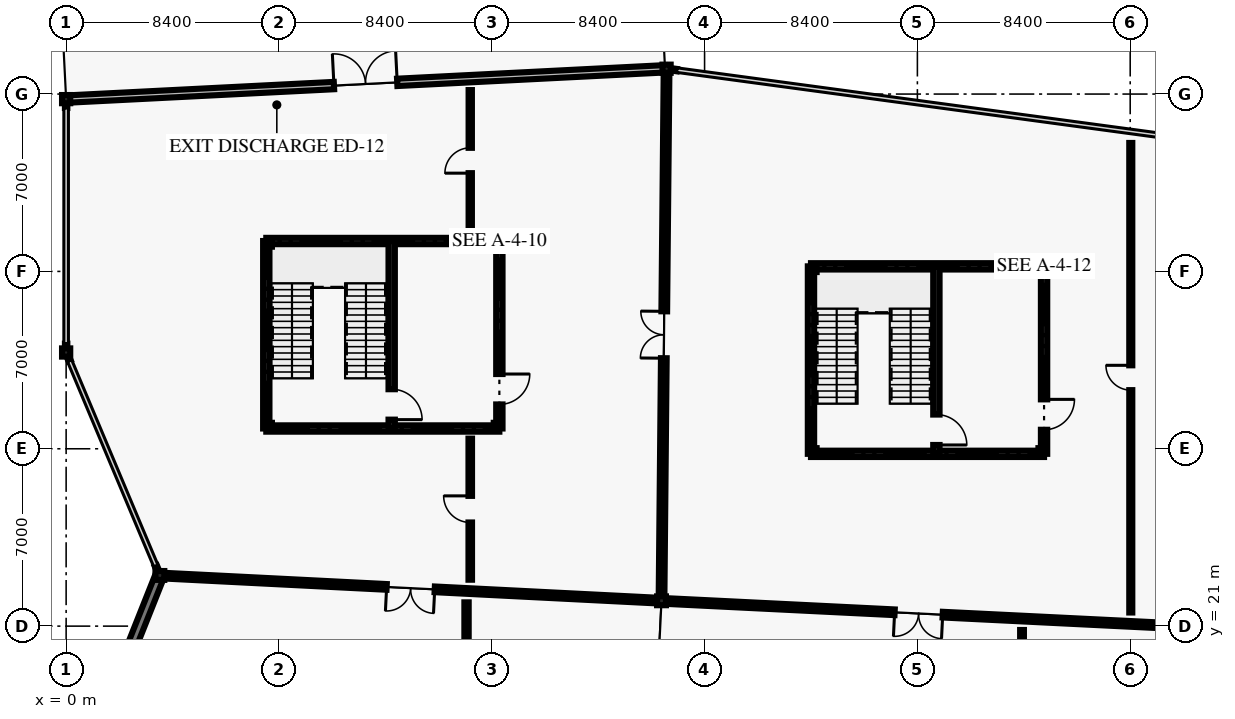
"""IFC4 building model, lengths in metres.
Left out: names, types, materials, properties, quantities, classifications, styles, units other than length and angle.
Written with IfcOpenShell. Run it as: python <this file> out.ifc"""

import sys

from ifc_helpers import new_model, si_unit, direction, frame, frame_2d, origin, origin_2d, place, context, subcontext, project, spatial, rectangle, hollow_circle, i_section, extrude, element, fill, save


model = new_model("IFC4")
c1 = context("Model", 3, precision=1e-05, world=origin(), true_north=direction((0.0, 1.0)))
c2 = subcontext(c1, "Body", "Model", "MODEL_VIEW")
j1 = project(units=[si_unit("LENGTHUNIT", "METRE"), si_unit("PLANEANGLEUNIT", "RADIAN")], contexts=[c1])
p1 = place(None, origin())
s1 = spatial("IfcSite", under=j1, at=p1, CompositionType="ELEMENT")
p2 = place(p1, origin())
s2 = spatial("IfcBuilding", under=s1, at=p2, CompositionType="ELEMENT")
p3 = place(p2, origin())
s3 = spatial("IfcBuildingStorey", under=s2, at=p3, CompositionType="ELEMENT", Elevation=0.0)
for number, where, z_axis, x_axis in (
    (1, (0.0, 31.8, 0.0), (0.0, 0.0, 1.0), (1.0, 0.0, 0.0)),
    (2, (0.0, 41.8, 0.0), (0.0, 0.0, 1.0), (1.0, 0.0, 0.0)),
):
    element("IfcColumn", number, at=place(p3, frame(where, z_axis=z_axis, x_axis=x_axis)), inside=s3, PredefinedType="COLUMN", context=c2, shape_type="SweptSolid", body=[
        extrude(hollow_circle(Radius=0.162, WallThickness=0.01, at=origin_2d()), origin(), (0.0, 0.0, 1.0), 5.4),
    ])
for number, where, z_axis, x_axis in (
    (3, (3.7, 23.0, 0.0), (0.0, 0.0, 1.0), (1.0, 0.0, 0.0)),
    (4, (23.5, 22.0, 0.0), (0.0, 0.0, 1.0), (1.0, 0.0, 0.0)),
):
    element("IfcColumn", number, at=place(p3, frame(where, z_axis=z_axis, x_axis=x_axis)), inside=s3, PredefinedType="COLUMN", context=c2, shape_type="SweptSolid", body=[
        extrude(i_section(OverallWidth=0.35, OverallDepth=0.35, WebThickness=0.02, FlangeThickness=0.028, at=origin_2d()), origin(), (0.0, 0.0, 1.0), 5.4),
    ])
p4 = place(p3, frame((23.7, 43.0, 0.0), z_axis=(0.0, 0.0, 1.0), x_axis=(1.0, 0.0, 0.0)))
e5 = element("IfcColumn", 5, at=p4, inside=s3, PredefinedType="COLUMN", context=c2, shape_type="SweptSolid", body=[
    extrude(hollow_circle(Radius=0.162, WallThickness=0.01, at=origin_2d()), origin(), (0.0, 0.0, 1.0), 5.4),
])
for number, where, z_axis, x_axis in (
    (6, (8.02, 28.92, 0.0), (0.0, 0.0, 1.0), (1.0, 0.0, 0.0)),
    (7, (16.98, 28.92, 0.0), (0.0, 0.0, 1.0), (1.0, 0.0, 0.0)),
    (8, (16.98, 36.08, 0.0), (0.0, 0.0, 1.0), (1.0, 0.0, 0.0)),
    (9, (8.02, 36.08, 0.0), (0.0, 0.0, 1.0), (1.0, 0.0, 0.0)),
    (10, (29.52, 27.92, 0.0), (0.0, 0.0, 1.0), (1.0, 0.0, 0.0)),
    (11, (38.48, 27.92, 0.0), (0.0, 0.0, 1.0), (1.0, 0.0, 0.0)),
    (12, (38.48, 35.08, 0.0), (0.0, 0.0, 1.0), (1.0, 0.0, 0.0)),
    (13, (29.52, 35.08, 0.0), (0.0, 0.0, 1.0), (1.0, 0.0, 0.0)),
):
    element("IfcColumn", number, at=place(p3, frame(where, z_axis=z_axis, x_axis=x_axis)), inside=s3, PredefinedType="COLUMN", context=c2, shape_type="SweptSolid", body=[
        extrude(i_section(OverallWidth=0.205, OverallDepth=0.21, WebThickness=0.009, FlangeThickness=0.014, FilletRadius=0.01, at=origin_2d()), origin(), (0.0, 0.0, 1.0), 5.4),
    ])
p5 = place(p3, frame((0.0, 13.7, 0.0), z_axis=(0.0, 0.0, 1.0), x_axis=(0.36968498985, 0.929157149399, 0.0)))
e14 = element("IfcWall", 14, at=p5, inside=s3, PredefinedType="SOLIDWALL", context=c2, shape_type="SweptSolid", body=[
    extrude(rectangle(XDim=9.949, YDim=0.36, at=frame_2d((4.975, 0.0))), origin(), (0.0, 0.0, 1.0), 4.22),
])
p6 = place(p3, frame((0.0, 41.8, 0.0), z_axis=(0.0, 0.0, 1.0), x_axis=(0.998720475109, 0.05057086709, 0.0)))
e15 = element("IfcWall", 15, at=p6, inside=s3, PredefinedType="SOLIDWALL", context=c2, shape_type="SweptSolid", body=[
    extrude(rectangle(XDim=23.67, YDim=0.29, at=frame_2d((11.835, 0.0))), origin(), (0.0, 0.0, 1.0), 4.22),
])
p7 = place(p6, frame((10.585, 0.0, 0.0)))
e16 = element("IfcOpeningElement", 16, at=p7, cuts=e15, PredefinedType="OPENING", context=c2, shape_type="SweptSolid", body=[
    extrude(rectangle(XDim=2.5, YDim=2.45, at=frame_2d((1.25, 1.225))), frame((0.0, 0.155, 0.0), z_axis=(0.0, -1.0, 0.0), x_axis=(1.0, 0.0, 0.0)), (0.0, 0.0, 1.0), 0.31),
])
p8 = place(p3, frame((0.0, 31.842, 0.0), z_axis=(0.0, 0.0, 1.0), x_axis=(0.0, 1.0, 0.0)))
e17 = element("IfcWall", 17, at=p8, inside=s3, PredefinedType="SOLIDWALL", context=c2, shape_type="SweptSolid", body=[
    extrude(rectangle(XDim=0.308, YDim=0.095, at=frame_2d((0.154, 0.0))), origin(), (0.0, 0.0, 1.0), 4.22),
])
for number, where, z_axis, x_axis in (
    (18, (0.0, 41.45, 0.0), (0.0, 0.0, 1.0), (0.0, 1.0, 0.0)),
    (19, (3.661, 23.094, 0.0), (0.0, 0.0, 1.0), (-0.389, 0.921, 0.0)),
    (20, (0.136, 31.477, 0.0), (0.0, 0.0, 1.0), (-0.389, 0.921, 0.0)),
):
    element("IfcWall", number, at=place(p3, frame(where, z_axis=z_axis, x_axis=x_axis)), inside=s3, PredefinedType="SOLIDWALL", context=c2, shape_type="SweptSolid", body=[
        extrude(rectangle(XDim=0.308, YDim=0.095, at=frame_2d((0.154, 0.0))), origin(), (0.0, 0.0, 1.0), 4.22),
    ])
p9 = place(p3, frame((23.802, 42.986, 0.0), z_axis=(0.0, 0.0, 1.0), x_axis=(0.991074779294, -0.133307096014, 0.0)))
e21 = element("IfcWall", 21, at=p9, inside=s3, PredefinedType="SOLIDWALL", context=c2, shape_type="SweptSolid", body=[
    extrude(rectangle(XDim=0.308, YDim=0.095, at=frame_2d((0.154, 0.0))), origin(), (0.0, 0.0, 1.0), 4.22),
])
p10 = place(p3, frame((23.5, 22.0, 0.0), z_axis=(0.0, 0.0, 1.0), x_axis=(-0.99872706092, 0.050440636263, 0.0)))
e22 = element("IfcWall", 22, at=p10, inside=s3, PredefinedType="SOLIDWALL", context=c2, shape_type="SweptSolid", body=[
    extrude(rectangle(XDim=19.825, YDim=0.225, at=frame_2d((9.913, 0.0))), origin(), (0.0, 0.0, 1.0), 4.62),
])
p11 = place(p10, frame((8.963, 0.0, 0.0)))
e23 = element("IfcOpeningElement", 23, at=p11, cuts=e22, PredefinedType="OPENING", context=c2, shape_type="SweptSolid", body=[
    extrude(rectangle(XDim=1.9, YDim=2.35, at=frame_2d((0.95, 1.175))), frame((0.0, 0.123, 0.0), z_axis=(0.0, -1.0, 0.0), x_axis=(1.0, 0.0, 0.0)), (0.0, 0.0, 1.0), 0.245),
])
p12 = place(p3, frame((43.8, 21.0, 0.0), z_axis=(0.0, 0.0, 1.0), x_axis=(-0.998788882418, 0.049201304434, 0.0)))
e24 = element("IfcWall", 24, at=p12, inside=s3, PredefinedType="SOLIDWALL", context=c2, shape_type="SweptSolid", body=[
    extrude(rectangle(XDim=20.325, YDim=0.225, at=frame_2d((10.162, 0.0))), origin(), (0.0, 0.0, 1.0), 4.62),
])
p13 = place(p12, frame((9.212, 0.0, 0.0)))
e25 = element("IfcOpeningElement", 25, at=p13, cuts=e24, PredefinedType="OPENING", context=c2, shape_type="SweptSolid", body=[
    extrude(rectangle(XDim=1.9, YDim=2.35, at=frame_2d((0.95, 1.175))), frame((0.0, 0.123, 0.0), z_axis=(0.0, -1.0, 0.0), x_axis=(1.0, 0.0, 0.0)), (0.0, 0.0, 1.0), 0.245),
])
p14 = place(p3, frame((23.5, 22.0, 0.0), z_axis=(0.0, 0.0, 1.0), x_axis=(0.009521052802, 0.99995467375, 0.0)))
e26 = element("IfcWall", 26, at=p14, inside=s3, PredefinedType="SOLIDWALL", context=c2, shape_type="SweptSolid", body=[
    extrude(rectangle(XDim=21.001, YDim=0.225, at=frame_2d((10.5, 0.0))), origin(), (0.0, 0.0, 1.0), 4.62),
])
p15 = place(p14, frame((9.575, 0.0, 0.0)))
e27 = element("IfcOpeningElement", 27, at=p15, cuts=e26, PredefinedType="OPENING", context=c2, shape_type="SweptSolid", body=[
    extrude(rectangle(XDim=1.85, YDim=2.4, at=frame_2d((0.925, 1.2))), frame((0.0, 0.123, 0.0), z_axis=(0.0, -1.0, 0.0), x_axis=(1.0, 0.0, 0.0)), (0.0, 0.0, 1.0), 0.245),
])
p16 = place(p3, frame((15.804, 1.018, 0.0), z_axis=(0.0, 0.0, 1.0), x_axis=(0.0, 1.0, 0.0)))
e28 = element("IfcWall", 28, at=p16, inside=s3, PredefinedType="PARTITIONING", context=c2, shape_type="SweptSolid", body=[
    extrude(rectangle(XDim=20.92, YDim=0.17, at=frame_2d((10.46, 0.0))), origin(), (0.0, 0.0, 1.0), 3.92),
])
p17 = place(p16, frame((9.985, 0.0, 0.0)))
e29 = element("IfcOpeningElement", 29, at=p17, cuts=e28, PredefinedType="OPENING", context=c2, shape_type="SweptSolid", body=[
    extrude(rectangle(XDim=0.95, YDim=2.15, at=frame_2d((0.475, 1.075))), frame((0.0, 0.095, 0.0), z_axis=(0.0, -1.0, 0.0), x_axis=(1.0, 0.0, 0.0)), (0.0, 0.0, 1.0), 0.19),
])
p18 = place(p3, frame((37.73, 16.1, 0.0), z_axis=(0.0, 0.0, 1.0), x_axis=(0.0, 1.0, 0.0)))
e30 = element("IfcWall", 30, at=p18, inside=s3, PredefinedType="PARTITIONING", context=c2, shape_type="SweptSolid", body=[
    extrude(rectangle(XDim=4.748, YDim=0.15, at=frame_2d((2.374, 0.0))), origin(), (0.0, 0.0, 1.0), 3.92),
])
p19 = place(p18, frame((1.884, 0.0, 0.0)))
e31 = element("IfcOpeningElement", 31, at=p19, cuts=e30, PredefinedType="OPENING", context=c2, shape_type="SweptSolid", body=[
    extrude(rectangle(XDim=0.98, YDim=2.15, at=frame_2d((0.49, 1.075))), frame((0.0, 0.085, 0.0), z_axis=(0.0, -1.0, 0.0), x_axis=(1.0, 0.0, 0.0)), (0.0, 0.0, 1.0), 0.17),
])
p20 = place(p3, frame((15.951, 22.832, 0.0), z_axis=(0.0, 0.0, 1.0), x_axis=(0.0, 1.0, 0.0)))
e32 = element("IfcWall", 32, at=p20, inside=s3, PredefinedType="PARTITIONING", context=c2, shape_type="SweptSolid", body=[
    extrude(rectangle(XDim=5.568, YDim=0.14, at=frame_2d((2.784, 0.0))), origin(), (0.0, 0.0, 1.0), 3.92),
])
p21 = place(p20, frame((2.259, 0.0, 0.0)))
e33 = element("IfcOpeningElement", 33, at=p21, cuts=e32, PredefinedType="OPENING", context=c2, shape_type="SweptSolid", body=[
    extrude(rectangle(XDim=1.05, YDim=2.2, at=frame_2d((0.525, 1.1))), frame((0.0, 0.08, 0.0), z_axis=(0.0, -1.0, 0.0), x_axis=(1.0, 0.0, 0.0)), (0.0, 0.0, 1.0), 0.16),
])
p22 = place(p3, frame((15.951, 36.6, 0.0), z_axis=(0.0, 0.0, 1.0), x_axis=(0.0, 1.0, 0.0)))
e34 = element("IfcWall", 34, at=p22, inside=s3, PredefinedType="PARTITIONING", context=c2, shape_type="SweptSolid", body=[
    extrude(rectangle(XDim=5.557, YDim=0.13, at=frame_2d((2.778, 0.0))), origin(), (0.0, 0.0, 1.0), 3.92),
])
p23 = place(p22, frame((2.278, 0.0, 0.0)))
e35 = element("IfcOpeningElement", 35, at=p23, cuts=e34, PredefinedType="OPENING", context=c2, shape_type="SweptSolid", body=[
    extrude(rectangle(XDim=1.0, YDim=2.15, at=frame_2d((0.5, 1.075))), frame((0.0, 0.075, 0.0), z_axis=(0.0, -1.0, 0.0), x_axis=(1.0, 0.0, 0.0)), (0.0, 0.0, 1.0), 0.15),
])
p24 = place(p3, frame((42.023, 21.538, 0.0), z_axis=(0.0, 0.0, 1.0), x_axis=(0.0, 1.0, 0.0)))
e36 = element("IfcWall", 36, at=p24, inside=s3, PredefinedType="PARTITIONING", context=c2, shape_type="SweptSolid", body=[
    extrude(rectangle(XDim=18.532, YDim=0.12, at=frame_2d((9.266, 0.0))), origin(), (0.0, 0.0, 1.0), 3.92),
])
p25 = place(p24, frame((8.776, 0.0, 0.0)))
e37 = element("IfcOpeningElement", 37, at=p25, cuts=e36, PredefinedType="OPENING", context=c2, shape_type="SweptSolid", body=[
    extrude(rectangle(XDim=0.98, YDim=2.15, at=frame_2d((0.49, 1.075))), frame((0.0, 0.07, 0.0), z_axis=(0.0, -1.0, 0.0), x_axis=(1.0, 0.0, 0.0)), (0.0, 0.0, 1.0), 0.14),
])
p26 = place(p3, frame((7.9, 28.8, 0.0), z_axis=(0.0, 0.0, 1.0), x_axis=(0.0, 1.0, 0.0)))
e38 = element("IfcWall", 38, at=p26, inside=s3, PredefinedType="SHEAR", context=c2, shape_type="SweptSolid", body=[
    extrude(rectangle(XDim=7.4, YDim=0.25, at=frame_2d((3.7, 0.0))), origin(), (0.0, 0.0, 1.0), 5.16),
])
for number, where, z_axis, x_axis in (
    (39, (7.9, 36.2, 0.0), (0.0, 0.0, 1.0), (1.0, 0.0, 0.0)),
    (40, (17.1, 28.8, 0.0), (0.0, 0.0, 1.0), (-1.0, 0.0, 0.0)),
):
    element("IfcWall", number, at=place(p3, frame(where, z_axis=z_axis, x_axis=x_axis)), inside=s3, PredefinedType="SHEAR", context=c2, shape_type="SweptSolid", body=[
        extrude(rectangle(XDim=9.2, YDim=0.25, at=frame_2d((4.6, 0.0))), origin(), (0.0, 0.0, 1.0), 5.16),
    ])
p27 = place(p3, frame((17.1, 36.2, 0.0), z_axis=(0.0, 0.0, 1.0), x_axis=(0.0, -1.0, 0.0)))
e41 = element("IfcWall", 41, at=p27, inside=s3, PredefinedType="SHEAR", context=c2, shape_type="SweptSolid", body=[
    extrude(rectangle(XDim=7.4, YDim=0.25, at=frame_2d((3.7, 0.0))), origin(), (0.0, 0.0, 1.0), 5.16),
])
p28 = place(p27, frame((5.25, 0.0, 0.0)))
e42 = element("IfcOpeningElement", 42, at=p28, cuts=e41, PredefinedType="OPENING", context=c2, shape_type="SweptSolid", body=[
    extrude(rectangle(XDim=1.2, YDim=2.2, at=frame_2d((0.6, 1.1))), frame((0.0, 0.135, 0.0), z_axis=(0.0, -1.0, 0.0), x_axis=(1.0, 0.0, 0.0)), (0.0, 0.0, 1.0), 0.27),
])
p29 = place(p3, frame((12.85, 36.2, 0.0), z_axis=(0.0, 0.0, 1.0), x_axis=(0.0, -1.0, 0.0)))
e43 = element("IfcWall", 43, at=p29, inside=s3, PredefinedType="SHEAR", context=c2, shape_type="SweptSolid", body=[
    extrude(rectangle(XDim=7.4, YDim=0.25, at=frame_2d((3.7, 0.0))), origin(), (0.0, 0.0, 1.0), 5.16),
])
p30 = place(p29, frame((5.85, 0.0, 0.0)))
e44 = element("IfcOpeningElement", 44, at=p30, cuts=e43, PredefinedType="OPENING", context=c2, shape_type="SweptSolid", body=[
    extrude(rectangle(XDim=1.2, YDim=2.2, at=frame_2d((0.6, 1.1))), frame((0.0, 0.135, 0.0), z_axis=(0.0, -1.0, 0.0), x_axis=(1.0, 0.0, 0.0)), (0.0, 0.0, 1.0), 0.27),
])
p31 = place(p3, frame((29.4, 27.8, 0.0), z_axis=(0.0, 0.0, 1.0), x_axis=(0.0, 1.0, 0.0)))
e45 = element("IfcWall", 45, at=p31, inside=s3, PredefinedType="SHEAR", context=c2, shape_type="SweptSolid", body=[
    extrude(rectangle(XDim=7.4, YDim=0.25, at=frame_2d((3.7, 0.0))), origin(), (0.0, 0.0, 1.0), 5.16),
])
for number, where, z_axis, x_axis in (
    (46, (29.4, 35.2, 0.0), (0.0, 0.0, 1.0), (1.0, 0.0, 0.0)),
    (47, (38.6, 27.8, 0.0), (0.0, 0.0, 1.0), (-1.0, 0.0, 0.0)),
):
    element("IfcWall", number, at=place(p3, frame(where, z_axis=z_axis, x_axis=x_axis)), inside=s3, PredefinedType="SHEAR", context=c2, shape_type="SweptSolid", body=[
        extrude(rectangle(XDim=9.2, YDim=0.25, at=frame_2d((4.6, 0.0))), origin(), (0.0, 0.0, 1.0), 5.16),
    ])
p32 = place(p3, frame((38.6, 35.2, 0.0), z_axis=(0.0, 0.0, 1.0), x_axis=(0.0, -1.0, 0.0)))
e48 = element("IfcWall", 48, at=p32, inside=s3, PredefinedType="SHEAR", context=c2, shape_type="SweptSolid", body=[
    extrude(rectangle(XDim=7.4, YDim=0.25, at=frame_2d((3.7, 0.0))), origin(), (0.0, 0.0, 1.0), 5.16),
])
p33 = place(p32, frame((5.25, 0.0, 0.0)))
e49 = element("IfcOpeningElement", 49, at=p33, cuts=e48, PredefinedType="OPENING", context=c2, shape_type="SweptSolid", body=[
    extrude(rectangle(XDim=1.2, YDim=2.2, at=frame_2d((0.6, 1.1))), frame((0.0, 0.135, 0.0), z_axis=(0.0, -1.0, 0.0), x_axis=(1.0, 0.0, 0.0)), (0.0, 0.0, 1.0), 0.27),
])
p34 = place(p3, frame((34.35, 35.2, 0.0), z_axis=(0.0, 0.0, 1.0), x_axis=(0.0, -1.0, 0.0)))
e50 = element("IfcWall", 50, at=p34, inside=s3, PredefinedType="SHEAR", context=c2, shape_type="SweptSolid", body=[
    extrude(rectangle(XDim=7.4, YDim=0.25, at=frame_2d((3.7, 0.0))), origin(), (0.0, 0.0, 1.0), 5.16),
])
p35 = place(p34, frame((5.85, 0.0, 0.0)))
e51 = element("IfcOpeningElement", 51, at=p35, cuts=e50, PredefinedType="OPENING", context=c2, shape_type="SweptSolid", body=[
    extrude(rectangle(XDim=1.2, YDim=2.2, at=frame_2d((0.6, 1.1))), frame((0.0, 0.135, 0.0), z_axis=(0.0, -1.0, 0.0), x_axis=(1.0, 0.0, 0.0)), (0.0, 0.0, 1.0), 0.27),
])
p36 = place(p7, origin())
e52 = element("IfcDoor", 52, at=p36, inside=s3, OperationType="DOUBLE_DOOR_SINGLE_SWING", PredefinedType="DOOR", context=c2, shape_type="SweptSolid", body=[
    extrude(rectangle(XDim=2.5, YDim=2.45, at=frame_2d((1.25, 1.225))), frame((0.0, 0.025, 0.0), z_axis=(0.0, -1.0, 0.0), x_axis=(1.0, 0.0, 0.0)), (0.0, 0.0, 1.0), 0.05),
])
fill(e16, e52)
p37 = place(p11, origin())
e53 = element("IfcDoor", 53, at=p37, inside=s3, OperationType="DOUBLE_DOOR_SINGLE_SWING", PredefinedType="DOOR", context=c2, shape_type="SweptSolid", body=[
    extrude(rectangle(XDim=1.9, YDim=2.35, at=frame_2d((0.95, 1.175))), frame((0.0, 0.025, 0.0), z_axis=(0.0, -1.0, 0.0), x_axis=(1.0, 0.0, 0.0)), (0.0, 0.0, 1.0), 0.05),
])
fill(e23, e53)
p38 = place(p13, origin())
e54 = element("IfcDoor", 54, at=p38, inside=s3, OperationType="DOUBLE_DOOR_SINGLE_SWING", PredefinedType="DOOR", context=c2, shape_type="SweptSolid", body=[
    extrude(rectangle(XDim=1.9, YDim=2.35, at=frame_2d((0.95, 1.175))), frame((0.0, 0.025, 0.0), z_axis=(0.0, -1.0, 0.0), x_axis=(1.0, 0.0, 0.0)), (0.0, 0.0, 1.0), 0.05),
])
fill(e25, e54)
p39 = place(p15, origin())
e55 = element("IfcDoor", 55, at=p39, inside=s3, OperationType="DOUBLE_DOOR_SINGLE_SWING", PredefinedType="DOOR", context=c2, shape_type="SweptSolid", body=[
    extrude(rectangle(XDim=1.85, YDim=2.4, at=frame_2d((0.925, 1.2))), frame((0.0, 0.025, 0.0), z_axis=(0.0, -1.0, 0.0), x_axis=(1.0, 0.0, 0.0)), (0.0, 0.0, 1.0), 0.05),
])
fill(e27, e55)
p40 = place(p21, origin())
e56 = element("IfcDoor", 56, at=p40, inside=s3, OperationType="SINGLE_SWING_RIGHT", PredefinedType="DOOR", context=c2, shape_type="SweptSolid", body=[
    extrude(rectangle(XDim=1.05, YDim=2.2, at=frame_2d((0.525, 1.1))), frame((0.0, 0.025, 0.0), z_axis=(0.0, -1.0, 0.0), x_axis=(1.0, 0.0, 0.0)), (0.0, 0.0, 1.0), 0.05),
])
fill(e33, e56)
p41 = place(p23, origin())
e57 = element("IfcDoor", 57, at=p41, inside=s3, OperationType="SINGLE_SWING_LEFT", PredefinedType="DOOR", context=c2, shape_type="SweptSolid", body=[
    extrude(rectangle(XDim=1.0, YDim=2.15, at=frame_2d((0.5, 1.075))), frame((0.0, 0.025, 0.0), z_axis=(0.0, -1.0, 0.0), x_axis=(1.0, 0.0, 0.0)), (0.0, 0.0, 1.0), 0.05),
])
fill(e35, e57)
p42 = place(p25, origin())
e58 = element("IfcDoor", 58, at=p42, inside=s3, OperationType="SINGLE_SWING_RIGHT", PredefinedType="DOOR", context=c2, shape_type="SweptSolid", body=[
    extrude(rectangle(XDim=0.98, YDim=2.15, at=frame_2d((0.49, 1.075))), frame((0.0, 0.025, 0.0), z_axis=(0.0, -1.0, 0.0), x_axis=(1.0, 0.0, 0.0)), (0.0, 0.0, 1.0), 0.05),
])
fill(e37, e58)
p43 = place(p28, origin())
e59 = element("IfcDoor", 59, at=p43, inside=s3, OperationType="SINGLE_SWING_LEFT", PredefinedType="DOOR", context=c2, shape_type="SweptSolid", body=[
    extrude(rectangle(XDim=1.2, YDim=2.2, at=frame_2d((0.6, 1.1))), frame((0.0, 0.025, 0.0), z_axis=(0.0, -1.0, 0.0), x_axis=(1.0, 0.0, 0.0)), (0.0, 0.0, 1.0), 0.05),
])
fill(e42, e59)
p44 = place(p30, origin())
e60 = element("IfcDoor", 60, at=p44, inside=s3, OperationType="SINGLE_SWING_RIGHT", PredefinedType="DOOR", context=c2, shape_type="SweptSolid", body=[
    extrude(rectangle(XDim=1.2, YDim=2.2, at=frame_2d((0.6, 1.1))), frame((0.0, 0.025, 0.0), z_axis=(0.0, -1.0, 0.0), x_axis=(1.0, 0.0, 0.0)), (0.0, 0.0, 1.0), 0.05),
])
fill(e44, e60)
p45 = place(p33, origin())
e61 = element("IfcDoor", 61, at=p45, inside=s3, OperationType="SINGLE_SWING_LEFT", PredefinedType="DOOR", context=c2, shape_type="SweptSolid", body=[
    extrude(rectangle(XDim=1.2, YDim=2.2, at=frame_2d((0.6, 1.1))), frame((0.0, 0.025, 0.0), z_axis=(0.0, -1.0, 0.0), x_axis=(1.0, 0.0, 0.0)), (0.0, 0.0, 1.0), 0.05),
])
fill(e49, e61)
p46 = place(p35, origin())
e62 = element("IfcDoor", 62, at=p46, inside=s3, OperationType="SINGLE_SWING_RIGHT", PredefinedType="DOOR", context=c2, shape_type="SweptSolid", body=[
    extrude(rectangle(XDim=1.2, YDim=2.2, at=frame_2d((0.6, 1.1))), frame((0.0, 0.025, 0.0), z_axis=(0.0, -1.0, 0.0), x_axis=(1.0, 0.0, 0.0)), (0.0, 0.0, 1.0), 0.05),
])
fill(e51, e62)
save(model, sys.argv[1])
